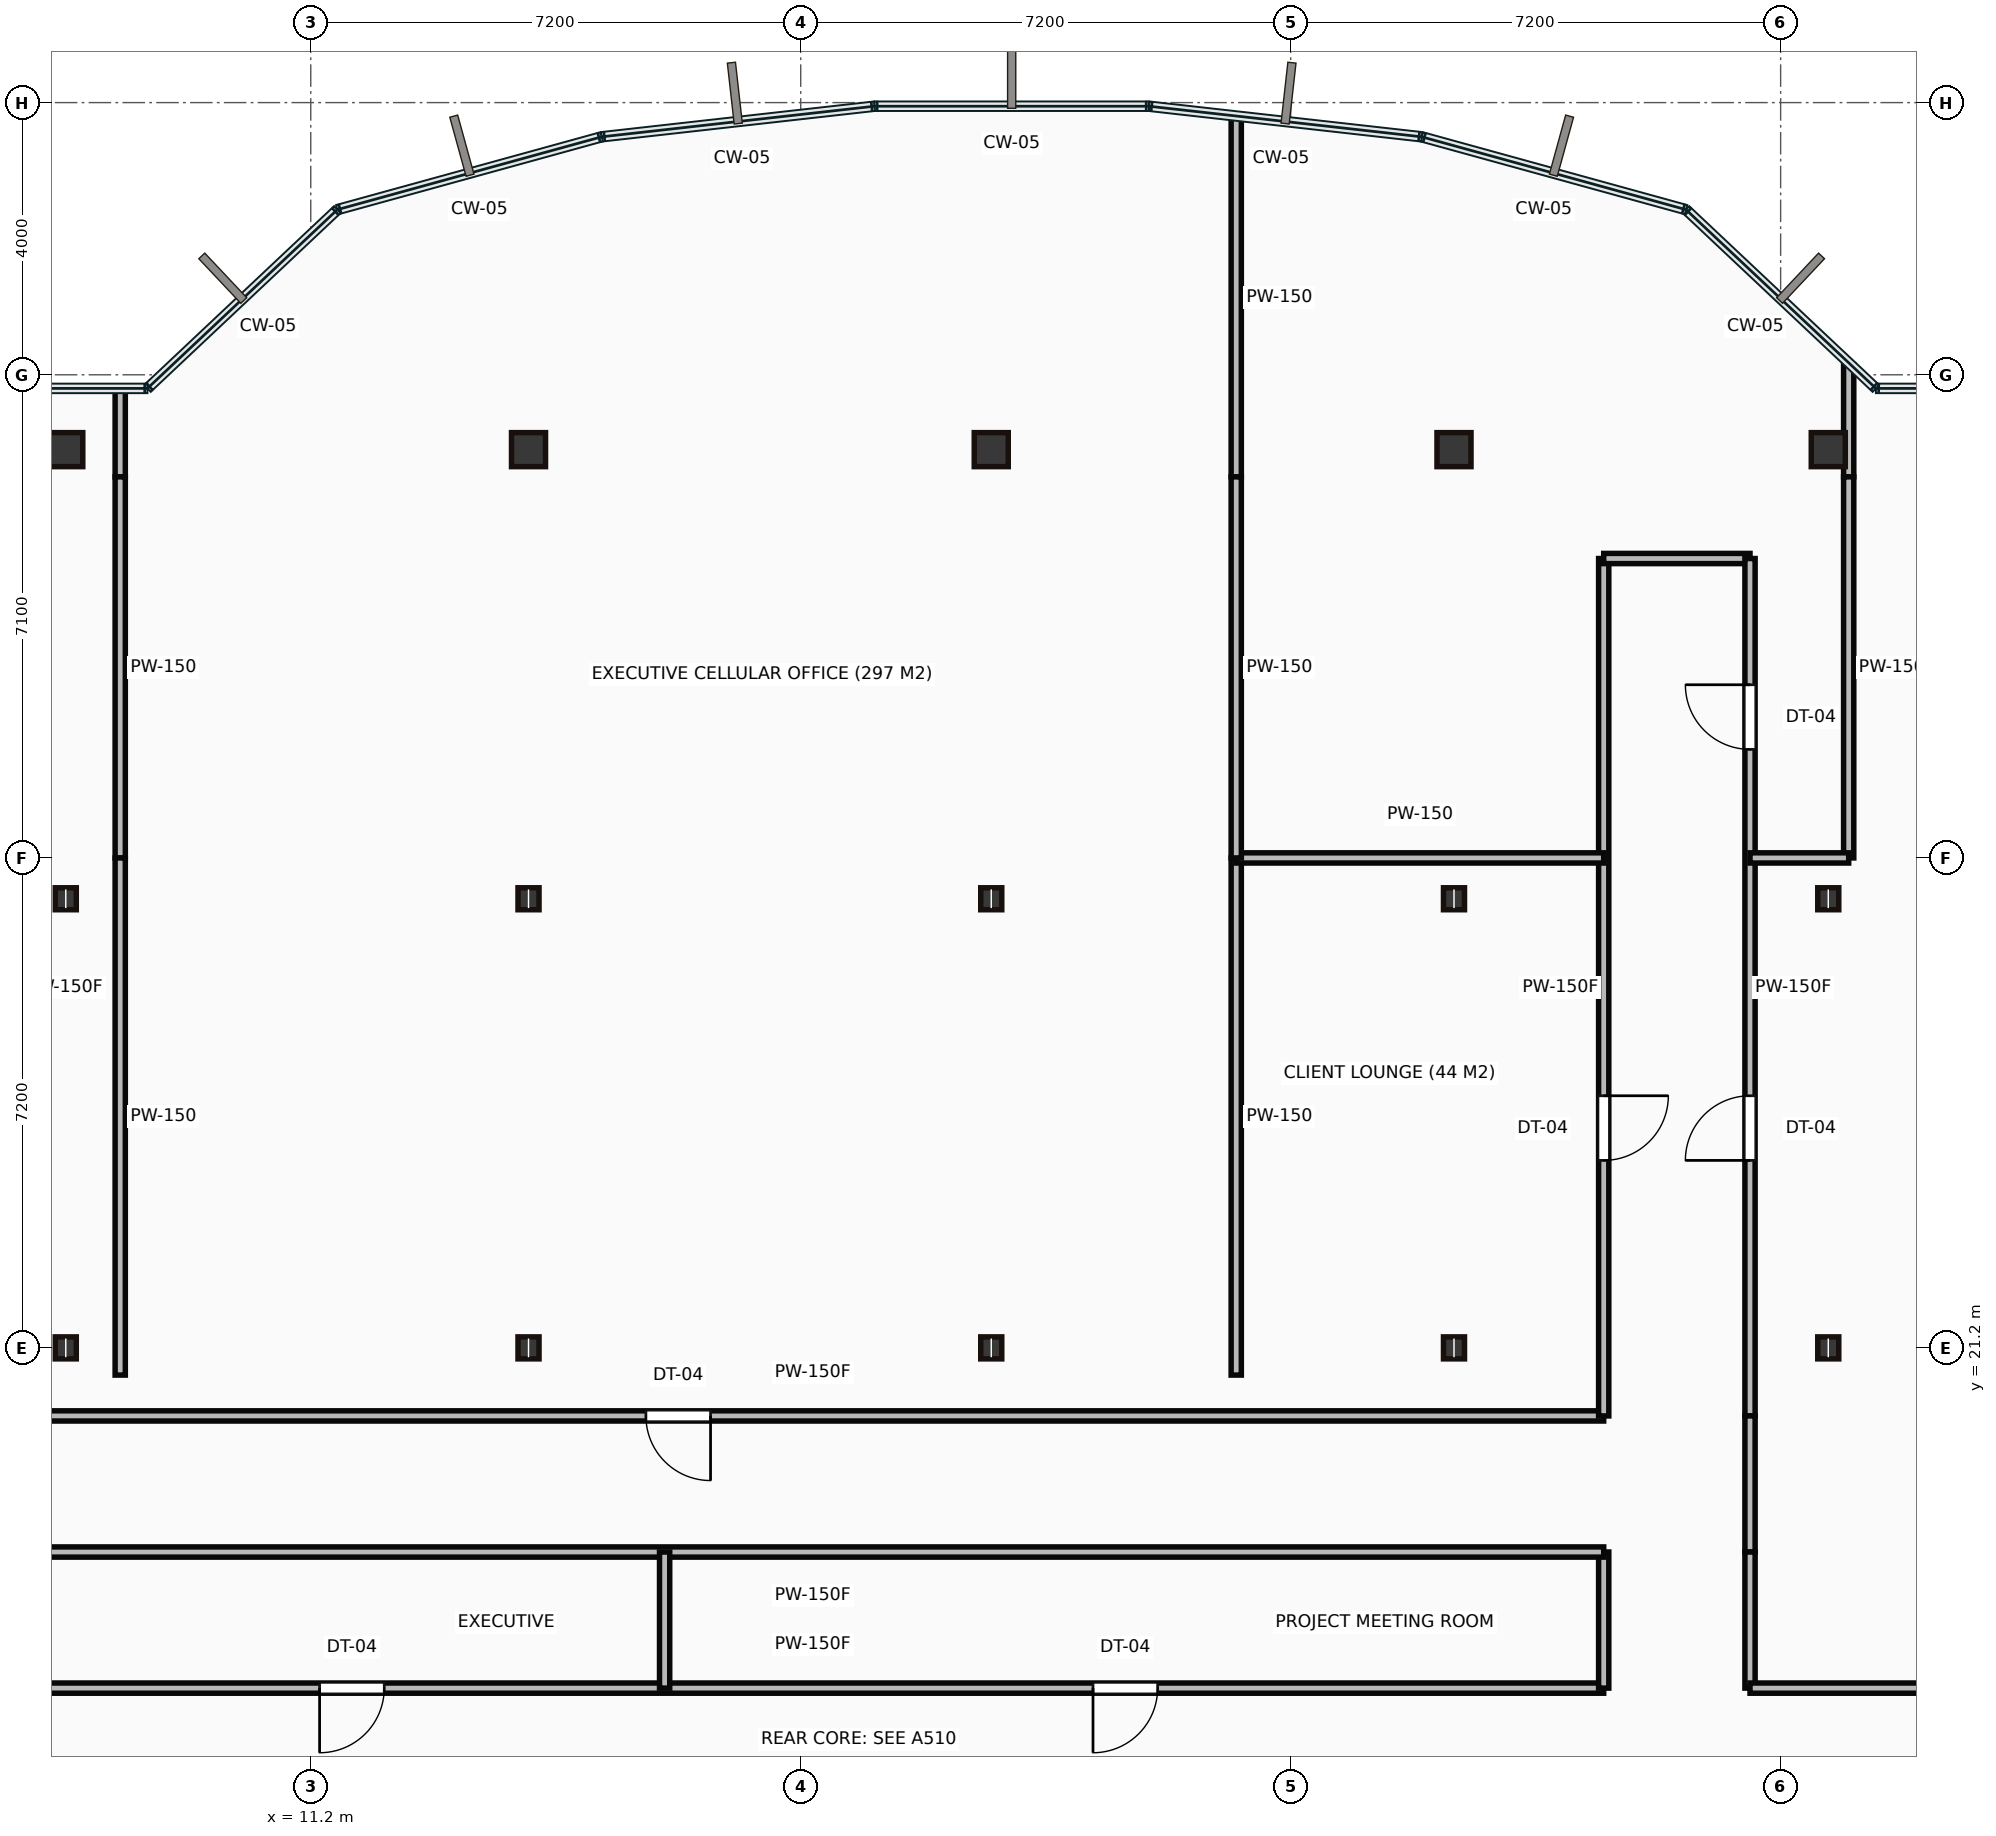
"""IFC4 building model, lengths in metres.
Left out: names, types, materials, properties, quantities, classifications, styles, units other than length and angle.
Written with IfcOpenShell. Run it as: python <this file> out.ifc"""

import sys

from ifc_helpers import new_model, si_unit, direction, frame, frame_2d, origin, origin_2d, place, context, subcontext, project, spatial, rectangle, hollow_rectangle, i_section, extrude, source, transform, mapped, element, fill, save


model = new_model("IFC4")
c1 = context("Model", 3, precision=1e-05, world=origin(), true_north=direction((0.0, 1.0)))
c2 = subcontext(c1, "Body", "Model", "MODEL_VIEW")
j1 = project(units=[si_unit("LENGTHUNIT", "METRE"), si_unit("PLANEANGLEUNIT", "RADIAN")], contexts=[c1])
p1 = place(None, origin())
s1 = spatial("IfcSite", under=j1, at=p1, CompositionType="ELEMENT")
p2 = place(p1, origin())
s2 = spatial("IfcBuilding", under=s1, at=p2, CompositionType="ELEMENT")
p3 = place(p2, frame((0.0, 0.0, 240.55)))
s3 = spatial("IfcBuildingStorey", under=s2, at=p3, CompositionType="ELEMENT", Elevation=240.55)
m1 = source(origin(), c2, "Body", "SweptSolid", [
    extrude(i_section(OverallWidth=0.309, OverallDepth=0.323, WebThickness=0.014, FlangeThickness=0.023, at=origin_2d()), origin(), (0.0, 0.0, 1.0), 3.65),
])
for number, where, z_axis, x_axis in (
    (1, (7.6, 21.2, 0.0), (0.0, 0.0, 1.0), (1.0, 0.0, 0.0)),
    (2, (7.6, 27.8, 0.0), (0.0, 0.0, 1.0), (1.0, 0.0, 0.0)),
):
    element("IfcColumn", number, at=place(p3, frame(where, z_axis=z_axis, x_axis=x_axis)), inside=s3, PredefinedType="COLUMN", context=c2, shape_type="MappedRepresentation", body=[
        mapped(m1, transform((0.0, 0.0, 0.0))),
    ])
m2 = source(origin(), c2, "Body", "SweptSolid", [
    extrude(hollow_rectangle(XDim=0.5, YDim=0.5, WallThickness=0.022, at=origin_2d()), origin(), (0.0, 0.0, 1.0), 3.65),
])
p4 = place(p3, frame((7.6, 34.4, 0.0), z_axis=(0.0, 0.0, 1.0), x_axis=(1.0, 0.0, 0.0)))
e3 = element("IfcColumn", 3, at=p4, inside=s3, PredefinedType="COLUMN", context=c2, shape_type="MappedRepresentation", body=[
    mapped(m2, transform((0.0, 0.0, 0.0))),
])
for number, where, z_axis, x_axis in (
    (4, (14.4, 21.2, 0.0), (0.0, 0.0, 1.0), (1.0, 0.0, 0.0)),
    (5, (14.4, 27.8, 0.0), (0.0, 0.0, 1.0), (1.0, 0.0, 0.0)),
):
    element("IfcColumn", number, at=place(p3, frame(where, z_axis=z_axis, x_axis=x_axis)), inside=s3, PredefinedType="COLUMN", context=c2, shape_type="MappedRepresentation", body=[
        mapped(m1, transform((0.0, 0.0, 0.0))),
    ])
p5 = place(p3, frame((14.4, 34.4, 0.0), z_axis=(0.0, 0.0, 1.0), x_axis=(1.0, 0.0, 0.0)))
e6 = element("IfcColumn", 6, at=p5, inside=s3, PredefinedType="COLUMN", context=c2, shape_type="MappedRepresentation", body=[
    mapped(m2, transform((0.0, 0.0, 0.0))),
])
for number, where, z_axis, x_axis in (
    (7, (21.2, 21.2, 0.0), (0.0, 0.0, 1.0), (1.0, 0.0, 0.0)),
    (8, (21.2, 27.8, 0.0), (0.0, 0.0, 1.0), (1.0, 0.0, 0.0)),
):
    element("IfcColumn", number, at=place(p3, frame(where, z_axis=z_axis, x_axis=x_axis)), inside=s3, PredefinedType="COLUMN", context=c2, shape_type="MappedRepresentation", body=[
        mapped(m1, transform((0.0, 0.0, 0.0))),
    ])
p6 = place(p3, frame((21.2, 34.4, 0.0), z_axis=(0.0, 0.0, 1.0), x_axis=(1.0, 0.0, 0.0)))
e9 = element("IfcColumn", 9, at=p6, inside=s3, PredefinedType="COLUMN", context=c2, shape_type="MappedRepresentation", body=[
    mapped(m2, transform((0.0, 0.0, 0.0))),
])
for number, where, z_axis, x_axis in (
    (10, (28.0, 21.2, 0.0), (0.0, 0.0, 1.0), (1.0, 0.0, 0.0)),
    (11, (28.0, 27.8, 0.0), (0.0, 0.0, 1.0), (1.0, 0.0, 0.0)),
):
    element("IfcColumn", number, at=place(p3, frame(where, z_axis=z_axis, x_axis=x_axis)), inside=s3, PredefinedType="COLUMN", context=c2, shape_type="MappedRepresentation", body=[
        mapped(m1, transform((0.0, 0.0, 0.0))),
    ])
p7 = place(p3, frame((28.0, 34.4, 0.0), z_axis=(0.0, 0.0, 1.0), x_axis=(1.0, 0.0, 0.0)))
e12 = element("IfcColumn", 12, at=p7, inside=s3, PredefinedType="COLUMN", context=c2, shape_type="MappedRepresentation", body=[
    mapped(m2, transform((0.0, 0.0, 0.0))),
])
for number, where, z_axis, x_axis in (
    (13, (33.5, 21.2, 0.0), (0.0, 0.0, 1.0), (1.0, 0.0, 0.0)),
    (14, (33.5, 27.8, 0.0), (0.0, 0.0, 1.0), (1.0, 0.0, 0.0)),
):
    element("IfcColumn", number, at=place(p3, frame(where, z_axis=z_axis, x_axis=x_axis)), inside=s3, PredefinedType="COLUMN", context=c2, shape_type="MappedRepresentation", body=[
        mapped(m1, transform((0.0, 0.0, 0.0))),
    ])
p8 = place(p3, frame((33.5, 34.4, 0.0), z_axis=(0.0, 0.0, 1.0), x_axis=(1.0, 0.0, 0.0)))
e15 = element("IfcColumn", 15, at=p8, inside=s3, PredefinedType="COLUMN", context=c2, shape_type="MappedRepresentation", body=[
    mapped(m2, transform((0.0, 0.0, 0.0))),
])
m3 = source(origin(), c2, "Body", "SweptSolid", [
    extrude(rectangle(XDim=23.25, YDim=0.15, at=frame_2d((11.625, 0.0))), origin(), (0.0, 0.0, 1.0), 3.4),
])
p9 = place(p3, frame((6.95, 20.2, 0.0), z_axis=(0.0, 0.0, 1.0), x_axis=(1.0, 0.0, 0.0)))
e16 = element("IfcWall", 16, at=p9, inside=s3, PredefinedType="PARTITIONING", context=c2, shape_type="MappedRepresentation", body=[
    mapped(m3, transform((0.0, 0.0, 0.0))),
])
p10 = place(p9, frame((9.175, 0.0, 0.0)))
e17 = element("IfcOpeningElement", 17, at=p10, cuts=e16, PredefinedType="OPENING", context=c2, shape_type="SweptSolid", body=[
    extrude(rectangle(XDim=0.95, YDim=2.15, at=frame_2d((0.475, 1.075))), frame((0.0, 0.085, 0.0), z_axis=(0.0, -1.0, 0.0), x_axis=(1.0, 0.0, 0.0)), (0.0, 0.0, 1.0), 0.17),
])
m4 = source(origin(), c2, "Body", "SweptSolid", [
    extrude(rectangle(XDim=12.6, YDim=0.15, at=frame_2d((6.3, 0.0))), origin(), (0.0, 0.0, 1.0), 3.4),
])
p11 = place(p3, frame((30.2, 20.2, 0.0), z_axis=(0.0, 0.0, 1.0), x_axis=(0.0, 1.0, 0.0)))
e18 = element("IfcWall", 18, at=p11, inside=s3, PredefinedType="PARTITIONING", context=c2, shape_type="MappedRepresentation", body=[
    mapped(m4, transform((0.0, 0.0, 0.0))),
])
p12 = place(p11, frame((3.755, 0.0, 0.0)))
e19 = element("IfcOpeningElement", 19, at=p12, cuts=e18, PredefinedType="OPENING", context=c2, shape_type="SweptSolid", body=[
    extrude(rectangle(XDim=0.95, YDim=2.15, at=frame_2d((0.475, 1.075))), frame((0.0, 0.085, 0.0), z_axis=(0.0, -1.0, 0.0), x_axis=(1.0, 0.0, 0.0)), (0.0, 0.0, 1.0), 0.17),
])
m5 = source(origin(), c2, "Body", "SweptSolid", [
    extrude(rectangle(XDim=2.15, YDim=0.15, at=frame_2d((1.075, 0.0))), origin(), (0.0, 0.0, 1.0), 3.4),
])
p13 = place(p3, frame((30.2, 32.8, 0.0), z_axis=(0.0, 0.0, 1.0), x_axis=(1.0, 0.0, 0.0)))
e20 = element("IfcWall", 20, at=p13, inside=s3, PredefinedType="PARTITIONING", context=c2, shape_type="MappedRepresentation", body=[
    mapped(m5, transform((0.0, 0.0, 0.0))),
])
p14 = place(p3, frame((32.35, 32.8, 0.0), z_axis=(0.0, 0.0, 1.0), x_axis=(0.0, -1.0, 0.0)))
e21 = element("IfcWall", 21, at=p14, inside=s3, PredefinedType="PARTITIONING", context=c2, shape_type="MappedRepresentation", body=[
    mapped(m4, transform((0.0, 0.0, 0.0))),
])
p15 = place(p14, frame((1.855, 0.0, 0.0)))
e22 = element("IfcOpeningElement", 22, at=p15, cuts=e21, PredefinedType="OPENING", context=c2, shape_type="SweptSolid", body=[
    extrude(rectangle(XDim=0.95, YDim=2.15, at=frame_2d((0.475, 1.075))), frame((0.0, 0.085, 0.0), z_axis=(0.0, -1.0, 0.0), x_axis=(1.0, 0.0, 0.0)), (0.0, 0.0, 1.0), 0.17),
])
p16 = place(p14, frame((7.895, 0.0, 0.0)))
e23 = element("IfcOpeningElement", 23, at=p16, cuts=e21, PredefinedType="OPENING", context=c2, shape_type="SweptSolid", body=[
    extrude(rectangle(XDim=0.95, YDim=2.15, at=frame_2d((0.475, 1.075))), frame((0.0, 0.085, 0.0), z_axis=(0.0, -1.0, 0.0), x_axis=(1.0, 0.0, 0.0)), (0.0, 0.0, 1.0), 0.17),
])
m6 = source(origin(), c2, "Body", "SweptSolid", [
    extrude(rectangle(XDim=2.0, YDim=0.15, at=frame_2d((1.0, 0.0))), origin(), (0.0, 0.0, 1.0), 3.4),
])
for number, where, z_axis, x_axis in (
    (24, (32.35, 20.2, 0.0), (0.0, 0.0, 1.0), (0.0, -1.0, 0.0)),
    (25, (32.35, 18.2, 0.0), (0.0, 0.0, 1.0), (0.0, -1.0, 0.0)),
):
    element("IfcWall", number, at=place(p3, frame(where, z_axis=z_axis, x_axis=x_axis)), inside=s3, PredefinedType="PARTITIONING", context=c2, shape_type="MappedRepresentation", body=[
        mapped(m6, transform((0.0, 0.0, 0.0))),
    ])
m7 = source(origin(), c2, "Body", "SweptSolid", [
    extrude(rectangle(XDim=6.85, YDim=0.15, at=frame_2d((3.425, 0.0))), origin(), (0.0, 0.0, 1.0), 3.4),
])
p17 = place(p3, frame((32.35, 16.2, 0.0), z_axis=(0.0, 0.0, 1.0), x_axis=(1.0, 0.0, 0.0)))
e26 = element("IfcWall", 26, at=p17, inside=s3, PredefinedType="PARTITIONING", context=c2, shape_type="MappedRepresentation", body=[
    mapped(m7, transform((0.0, 0.0, 0.0))),
])
p18 = place(p3, frame((6.95, 16.2, 0.0), z_axis=(0.0, 0.0, 1.0), x_axis=(1.0, 0.0, 0.0)))
e27 = element("IfcWall", 27, at=p18, inside=s3, PredefinedType="PARTITIONING", context=c2, shape_type="MappedRepresentation", body=[
    mapped(m3, transform((0.0, 0.0, 0.0))),
])
p19 = place(p18, frame((4.38, 0.0, 0.0)))
e28 = element("IfcOpeningElement", 28, at=p19, cuts=e27, PredefinedType="OPENING", context=c2, shape_type="SweptSolid", body=[
    extrude(rectangle(XDim=0.95, YDim=2.15, at=frame_2d((0.475, 1.075))), frame((0.0, 0.085, 0.0), z_axis=(0.0, -1.0, 0.0), x_axis=(1.0, 0.0, 0.0)), (0.0, 0.0, 1.0), 0.17),
])
p20 = place(p18, frame((15.745, 0.0, 0.0)))
e29 = element("IfcOpeningElement", 29, at=p20, cuts=e27, PredefinedType="OPENING", context=c2, shape_type="SweptSolid", body=[
    extrude(rectangle(XDim=0.95, YDim=2.15, at=frame_2d((0.475, 1.075))), frame((0.0, 0.085, 0.0), z_axis=(0.0, -1.0, 0.0), x_axis=(1.0, 0.0, 0.0)), (0.0, 0.0, 1.0), 0.17),
])
p21 = place(p3, frame((30.2, 16.2, 0.0), z_axis=(0.0, 0.0, 1.0), x_axis=(0.0, 1.0, 0.0)))
e30 = element("IfcWall", 30, at=p21, inside=s3, PredefinedType="PARTITIONING", context=c2, shape_type="MappedRepresentation", body=[
    mapped(m6, transform((0.0, 0.0, 0.0))),
])
p22 = place(p3, frame((30.2, 18.2, 0.0), z_axis=(0.0, 0.0, 1.0), x_axis=(-1.0, 0.0, 0.0)))
e31 = element("IfcWall", 31, at=p22, inside=s3, PredefinedType="PARTITIONING", context=c2, shape_type="MappedRepresentation", body=[
    mapped(m3, transform((0.0, 0.0, 0.0))),
])
m8 = source(origin(), c2, "Body", "SweptSolid", [
    extrude(rectangle(XDim=1.28, YDim=0.15, at=frame_2d((0.64, 0.0))), origin(), (0.0, 0.0, 1.0), 3.4),
])
p23 = place(p3, frame((8.4, 35.28, 0.0), z_axis=(0.0, 0.0, 1.0), x_axis=(0.0, -1.0, 0.0)))
e32 = element("IfcWall", 32, at=p23, inside=s3, PredefinedType="PARTITIONING", context=c2, shape_type="MappedRepresentation", body=[
    mapped(m8, transform((0.0, 0.0, 0.0))),
])
m9 = source(origin(), c2, "Body", "SweptSolid", [
    extrude(rectangle(XDim=5.6, YDim=0.15, at=frame_2d((2.8, 0.0))), origin(), (0.0, 0.0, 1.0), 3.4),
])
p24 = place(p3, frame((8.4, 34.0, 0.0), z_axis=(0.0, 0.0, 1.0), x_axis=(0.0, -1.0, 0.0)))
e33 = element("IfcWall", 33, at=p24, inside=s3, PredefinedType="PARTITIONING", context=c2, shape_type="MappedRepresentation", body=[
    mapped(m9, transform((0.0, 0.0, 0.0))),
])
m10 = source(origin(), c2, "Body", "SweptSolid", [
    extrude(rectangle(XDim=7.6, YDim=0.15, at=frame_2d((3.8, 0.0))), origin(), (0.0, 0.0, 1.0), 3.4),
])
p25 = place(p3, frame((8.4, 28.4, 0.0), z_axis=(0.0, 0.0, 1.0), x_axis=(0.0, -1.0, 0.0)))
e34 = element("IfcWall", 34, at=p25, inside=s3, PredefinedType="PARTITIONING", context=c2, shape_type="MappedRepresentation", body=[
    mapped(m10, transform((0.0, 0.0, 0.0))),
])
p26 = place(p3, frame((16.4, 18.2, 0.0), z_axis=(0.0, 0.0, 1.0), x_axis=(0.0, -1.0, 0.0)))
e35 = element("IfcWall", 35, at=p26, inside=s3, PredefinedType="PARTITIONING", context=c2, shape_type="MappedRepresentation", body=[
    mapped(m6, transform((0.0, 0.0, 0.0))),
])
p27 = place(p3, frame((24.8, 28.4, 0.0), z_axis=(0.0, 0.0, 1.0), x_axis=(0.0, -1.0, 0.0)))
e36 = element("IfcWall", 36, at=p27, inside=s3, PredefinedType="PARTITIONING", context=c2, shape_type="MappedRepresentation", body=[
    mapped(m10, transform((0.0, 0.0, 0.0))),
])
m11 = source(origin(), c2, "Body", "SweptSolid", [
    extrude(rectangle(XDim=5.4, YDim=0.15, at=frame_2d((2.7, 0.0))), origin(), (0.0, 0.0, 1.0), 3.4),
])
p28 = place(p3, frame((24.8, 28.4, 0.0), z_axis=(0.0, 0.0, 1.0), x_axis=(1.0, 0.0, 0.0)))
e37 = element("IfcWall", 37, at=p28, inside=s3, PredefinedType="PARTITIONING", context=c2, shape_type="MappedRepresentation", body=[
    mapped(m11, transform((0.0, 0.0, 0.0))),
])
m12 = source(origin(), c2, "Body", "SweptSolid", [
    extrude(rectangle(XDim=5.283, YDim=0.15, at=frame_2d((2.641, 0.0))), origin(), (0.0, 0.0, 1.0), 3.4),
])
p29 = place(p3, frame((24.8, 39.283, 0.0), z_axis=(0.0, 0.0, 1.0), x_axis=(0.0, -1.0, 0.0)))
e38 = element("IfcWall", 38, at=p29, inside=s3, PredefinedType="PARTITIONING", context=c2, shape_type="MappedRepresentation", body=[
    mapped(m12, transform((0.0, 0.0, 0.0))),
])
p30 = place(p3, frame((24.8, 34.0, 0.0), z_axis=(0.0, 0.0, 1.0), x_axis=(0.0, -1.0, 0.0)))
e39 = element("IfcWall", 39, at=p30, inside=s3, PredefinedType="PARTITIONING", context=c2, shape_type="MappedRepresentation", body=[
    mapped(m9, transform((0.0, 0.0, 0.0))),
])
m13 = source(origin(), c2, "Body", "SweptSolid", [
    extrude(rectangle(XDim=1.649, YDim=0.15, at=frame_2d((0.825, 0.0))), origin(), (0.0, 0.0, 1.0), 3.4),
])
p31 = place(p3, frame((33.8, 35.649, 0.0), z_axis=(0.0, 0.0, 1.0), x_axis=(0.0, -1.0, 0.0)))
e40 = element("IfcWall", 40, at=p31, inside=s3, PredefinedType="PARTITIONING", context=c2, shape_type="MappedRepresentation", body=[
    mapped(m13, transform((0.0, 0.0, 0.0))),
])
p32 = place(p3, frame((33.8, 34.0, 0.0), z_axis=(0.0, 0.0, 1.0), x_axis=(0.0, -1.0, 0.0)))
e41 = element("IfcWall", 41, at=p32, inside=s3, PredefinedType="PARTITIONING", context=c2, shape_type="MappedRepresentation", body=[
    mapped(m9, transform((0.0, 0.0, 0.0))),
])
m14 = source(origin(), c2, "Body", "SweptSolid", [
    extrude(rectangle(XDim=1.45, YDim=0.15, at=frame_2d((0.725, 0.0))), origin(), (0.0, 0.0, 1.0), 3.4),
])
p33 = place(p3, frame((33.8, 28.4, 0.0), z_axis=(0.0, 0.0, 1.0), x_axis=(-1.0, 0.0, 0.0)))
e42 = element("IfcWall", 42, at=p33, inside=s3, PredefinedType="PARTITIONING", context=c2, shape_type="MappedRepresentation", body=[
    mapped(m14, transform((0.0, 0.0, 0.0))),
])
m15 = source(origin(), c2, "Body", "SweptSolid", [
    extrude(rectangle(XDim=0.95, YDim=2.15, at=frame_2d((0.475, 1.075))), frame((0.0, 0.025, 0.0), z_axis=(0.0, -1.0, 0.0), x_axis=(1.0, 0.0, 0.0)), (0.0, 0.0, 1.0), 0.05),
])
p34 = place(p19, origin())
e43 = element("IfcDoor", 43, at=p34, inside=s3, OperationType="SINGLE_SWING_LEFT", PredefinedType="DOOR", context=c2, shape_type="MappedRepresentation", body=[
    mapped(m15, transform((0.0, 0.0, 0.0))),
])
fill(e28, e43)
p35 = place(p10, origin())
e44 = element("IfcDoor", 44, at=p35, inside=s3, OperationType="SINGLE_SWING_RIGHT", PredefinedType="DOOR", context=c2, shape_type="MappedRepresentation", body=[
    mapped(m15, transform((0.0, 0.0, 0.0))),
])
fill(e17, e44)
p36 = place(p20, origin())
e45 = element("IfcDoor", 45, at=p36, inside=s3, OperationType="SINGLE_SWING_LEFT", PredefinedType="DOOR", context=c2, shape_type="MappedRepresentation", body=[
    mapped(m15, transform((0.0, 0.0, 0.0))),
])
fill(e29, e45)
p37 = place(p12, origin())
e46 = element("IfcDoor", 46, at=p37, inside=s3, OperationType="SINGLE_SWING_RIGHT", PredefinedType="DOOR", context=c2, shape_type="MappedRepresentation", body=[
    mapped(m15, transform((0.0, 0.0, 0.0))),
])
fill(e19, e46)
p38 = place(p15, origin())
e47 = element("IfcDoor", 47, at=p38, inside=s3, OperationType="SINGLE_SWING_LEFT", PredefinedType="DOOR", context=c2, shape_type="MappedRepresentation", body=[
    mapped(m15, transform((0.0, 0.0, 0.0))),
])
fill(e22, e47)
p39 = place(p16, origin())
e48 = element("IfcDoor", 48, at=p39, inside=s3, OperationType="SINGLE_SWING_RIGHT", PredefinedType="DOOR", context=c2, shape_type="MappedRepresentation", body=[
    mapped(m15, transform((0.0, 0.0, 0.0))),
])
fill(e23, e48)
save(model, sys.argv[1])
